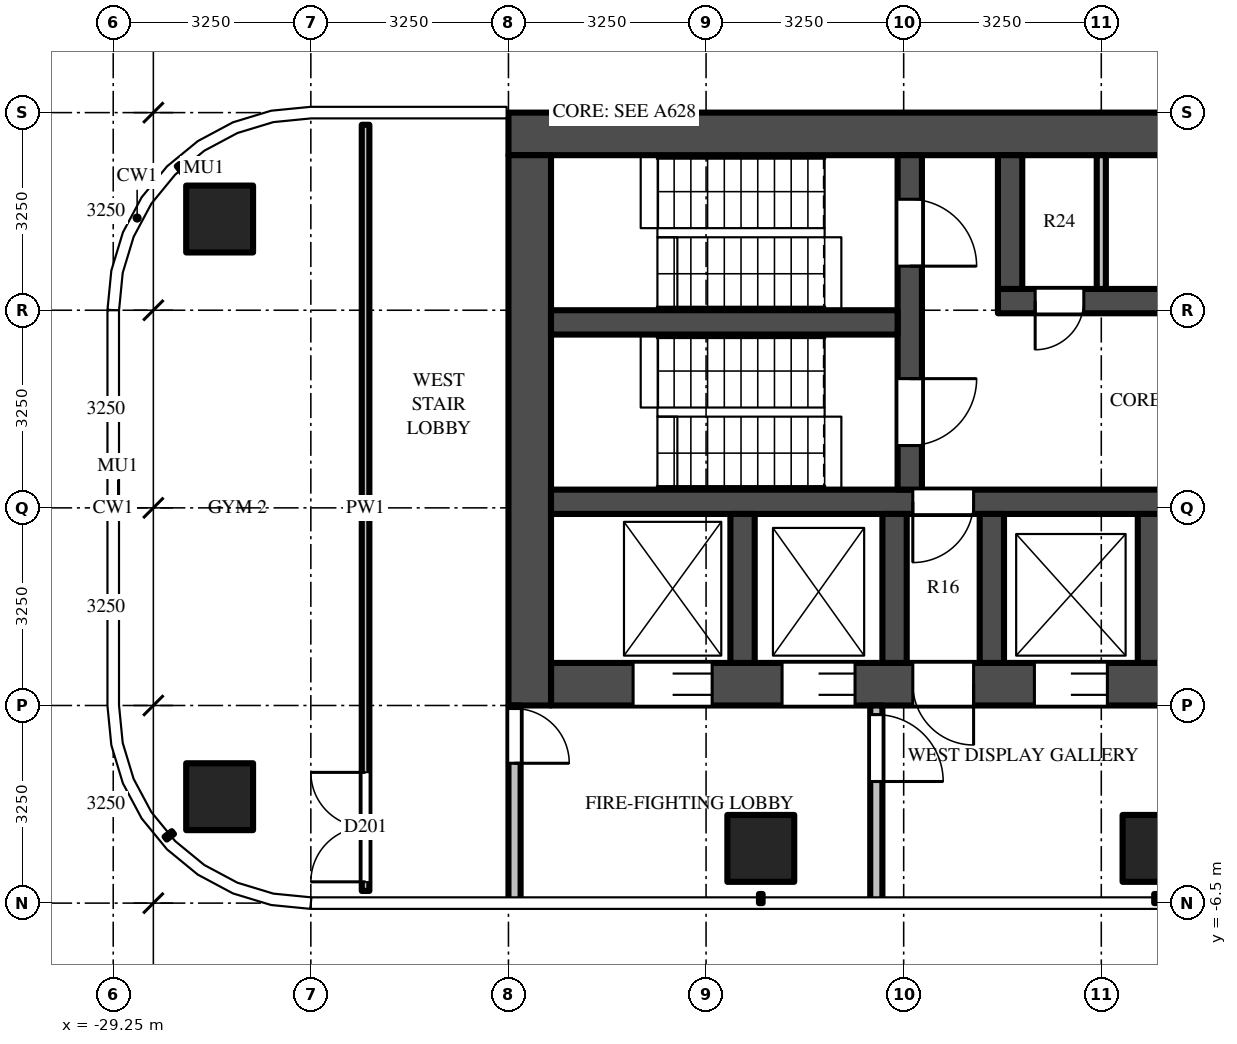
"""IFC4 building model, lengths in metres.
Left out: names, types, materials, properties, quantities, classifications, styles, units other than length and angle.
Written with IfcOpenShell. Run it as: python <this file> out.ifc"""

import sys

from ifc_helpers import new_model, si_unit, direction, frame, frame_2d, origin, origin_2d, place, context, subcontext, project, spatial, rectangle, extrude, source, transform, mapped, element, fill, save


model = new_model("IFC4")
c1 = context("Model", 3, precision=1e-05, world=origin(), true_north=direction((0.0, 1.0)))
c2 = subcontext(c1, "Body", "Model", "MODEL_VIEW")
j1 = project(units=[si_unit("LENGTHUNIT", "METRE"), si_unit("PLANEANGLEUNIT", "RADIAN")], contexts=[c1])
p1 = place(None, origin())
s1 = spatial("IfcSite", under=j1, at=p1, CompositionType="ELEMENT")
p2 = place(p1, origin())
s2 = spatial("IfcBuilding", under=s1, at=p2, CompositionType="ELEMENT")
p3 = place(p2, frame((0.0, 0.0, 220.7)))
s3 = spatial("IfcBuildingStorey", under=s2, at=p3, CompositionType="ELEMENT", Elevation=220.7)
m1 = source(origin(), c2, "Body", "SweptSolid", [
    extrude(rectangle(XDim=1.1, YDim=1.1, at=origin_2d()), origin(), (0.0, 0.0, 1.0), 3.9),
])
for number, where, z_axis, x_axis in (
    (1, (-12.1, -5.6, 0.0), (0.0, 0.0, 1.0), (1.0, 0.0, 0.0)),
    (2, (-18.6, -5.6, 0.0), (0.0, 0.0, 1.0), (1.0, 0.0, 0.0)),
    (3, (-27.5, -4.75, 0.0), (0.0, 0.0, 1.0), (1.0, 0.0, 0.0)),
    (4, (-27.5, 4.75, 0.0), (0.0, 0.0, 1.0), (1.0, 0.0, 0.0)),
):
    element("IfcColumn", number, at=place(p3, frame(where, z_axis=z_axis, x_axis=x_axis)), inside=s3, PredefinedType="COLUMN", context=c2, shape_type="MappedRepresentation", body=[
        mapped(m1, transform((0.0, 0.0, 0.0))),
    ])
m2 = source(origin(), c2, "Body", "SweptSolid", [
    extrude(rectangle(XDim=16.6, YDim=0.7, at=frame_2d((8.3, 0.0))), origin(), (0.0, 0.0, 1.0), 3.7),
])
p4 = place(p3, frame((-6.15, 6.15, 0.0), z_axis=(0.0, 0.0, 1.0), x_axis=(-1.0, 0.0, 0.0)))
e5 = element("IfcWall", 5, at=p4, inside=s3, PredefinedType="SHEAR", context=c2, shape_type="MappedRepresentation", body=[
    mapped(m2, transform((0.0, 0.0, 0.0))),
])
m3 = source(origin(), c2, "Body", "SweptSolid", [
    extrude(rectangle(XDim=14.85, YDim=0.7, at=frame_2d((7.425, 0.0))), origin(), (0.0, 0.0, 1.0), 3.7),
])
p5 = place(p3, frame((-7.2, -2.9, 0.0), z_axis=(0.0, 0.0, 1.0), x_axis=(-1.0, 0.0, 0.0)))
e6 = element("IfcWall", 6, at=p5, inside=s3, PredefinedType="SHEAR", context=c2, shape_type="MappedRepresentation", body=[
    mapped(m3, transform((0.0, 0.0, 0.0))),
])
m4 = source(origin(), c2, "Body", "SweptSolid", [
    extrude(rectangle(XDim=1.1, YDim=2.1, at=frame_2d((0.55, 1.05))), frame((0.0, 0.36, 0.0), z_axis=(0.0, -1.0, 0.0), x_axis=(1.0, 0.0, 0.0)), (0.0, 0.0, 1.0), 0.72),
])
p6 = place(p5, frame((0.55, 0.0, 0.0)))
e7 = element("IfcOpeningElement", 7, at=p6, cuts=e6, PredefinedType="OPENING", context=c2, shape_type="MappedRepresentation", body=[
    mapped(m4, transform((0.0, 0.0, 0.0))),
])
p7 = place(p5, frame((3.15, 0.0, 0.0)))
e8 = element("IfcOpeningElement", 8, at=p7, cuts=e6, PredefinedType="OPENING", context=c2, shape_type="MappedRepresentation", body=[
    mapped(m4, transform((0.0, 0.0, 0.0))),
])
m5 = source(origin(), c2, "Body", "SweptSolid", [
    extrude(rectangle(XDim=1.2, YDim=2.1, at=frame_2d((0.6, 1.05))), frame((0.0, 0.36, 0.0), z_axis=(0.0, -1.0, 0.0), x_axis=(1.0, 0.0, 0.0)), (0.0, 0.0, 1.0), 0.72),
])
p8 = place(p5, frame((5.7, 0.0, 0.0)))
e9 = element("IfcOpeningElement", 9, at=p8, cuts=e6, PredefinedType="OPENING", context=c2, shape_type="MappedRepresentation", body=[
    mapped(m5, transform((0.0, 0.0, 0.0))),
])
m6 = source(origin(), c2, "Body", "SweptSolid", [
    extrude(rectangle(XDim=1.3, YDim=2.1, at=frame_2d((0.65, 1.05))), frame((0.0, 0.36, 0.0), z_axis=(0.0, -1.0, 0.0), x_axis=(1.0, 0.0, 0.0)), (0.0, 0.0, 1.0), 0.72),
])
p9 = place(p5, frame((12.2, 0.0, 0.0)))
e10 = element("IfcOpeningElement", 10, at=p9, cuts=e6, PredefinedType="OPENING", context=c2, shape_type="MappedRepresentation", body=[
    mapped(m6, transform((0.0, 0.0, 0.0))),
])
p10 = place(p5, frame((9.85, 0.0, 0.0)))
e11 = element("IfcOpeningElement", 11, at=p10, cuts=e6, PredefinedType="OPENING", context=c2, shape_type="MappedRepresentation", body=[
    mapped(m5, transform((0.0, 0.0, 0.0))),
])
m7 = source(origin(), c2, "Body", "SweptSolid", [
    extrude(rectangle(XDim=1.0, YDim=2.1, at=frame_2d((0.5, 1.05))), frame((0.0, 0.36, 0.0), z_axis=(0.0, -1.0, 0.0), x_axis=(1.0, 0.0, 0.0)), (0.0, 0.0, 1.0), 0.72),
])
p11 = place(p5, frame((7.9, 0.0, 0.0)))
e12 = element("IfcOpeningElement", 12, at=p11, cuts=e6, PredefinedType="OPENING", context=c2, shape_type="MappedRepresentation", body=[
    mapped(m7, transform((0.0, 0.0, 0.0))),
])
m8 = source(origin(), c2, "Body", "SweptSolid", [
    extrude(rectangle(XDim=9.05, YDim=0.7, at=frame_2d((4.525, 0.0))), origin(), (0.0, 0.0, 1.0), 3.7),
])
p12 = place(p3, frame((-22.4, 5.8, 0.0), z_axis=(0.0, 0.0, 1.0), x_axis=(0.0, -1.0, 0.0)))
e13 = element("IfcWall", 13, at=p12, inside=s3, PredefinedType="SHEAR", context=c2, shape_type="MappedRepresentation", body=[
    mapped(m8, transform((0.0, 0.0, 0.0))),
])
m9 = source(origin(), c2, "Body", "SweptSolid", [
    extrude(rectangle(XDim=7.5, YDim=0.4, at=frame_2d((3.75, 0.0))), origin(), (0.0, 0.0, 1.0), 3.7),
])
p13 = place(p3, frame((-7.2, 3.4, 0.0), z_axis=(0.0, 0.0, 1.0), x_axis=(-1.0, 0.0, 0.0)))
e14 = element("IfcWall", 14, at=p13, inside=s3, PredefinedType="SHEAR", context=c2, shape_type="MappedRepresentation", body=[
    mapped(m9, transform((0.0, 0.0, 0.0))),
])
m10 = source(origin(), c2, "Body", "SweptSolid", [
    extrude(rectangle(XDim=1.0, YDim=2.1, at=frame_2d((0.5, 1.05))), frame((0.0, 0.21, 0.0), z_axis=(0.0, -1.0, 0.0), x_axis=(1.0, 0.0, 0.0)), (0.0, 0.0, 1.0), 0.42),
])
p14 = place(p13, frame((2.363, 0.0, 0.0)))
e15 = element("IfcOpeningElement", 15, at=p14, cuts=e14, PredefinedType="OPENING", context=c2, shape_type="MappedRepresentation", body=[
    mapped(m10, transform((0.0, 0.0, 0.0))),
])
m11 = source(origin(), c2, "Body", "SweptSolid", [
    extrude(rectangle(XDim=0.8, YDim=2.1, at=frame_2d((0.4, 1.05))), frame((0.0, 0.21, 0.0), z_axis=(0.0, -1.0, 0.0), x_axis=(1.0, 0.0, 0.0)), (0.0, 0.0, 1.0), 0.42),
])
p15 = place(p13, frame((6.087, 0.0, 0.0)))
e16 = element("IfcOpeningElement", 16, at=p15, cuts=e14, PredefinedType="OPENING", context=c2, shape_type="MappedRepresentation", body=[
    mapped(m11, transform((0.0, 0.0, 0.0))),
])
m12 = source(origin(), c2, "Body", "SweptSolid", [
    extrude(rectangle(XDim=14.85, YDim=0.4, at=frame_2d((7.425, 0.0))), origin(), (0.0, 0.0, 1.0), 3.7),
])
p16 = place(p3, frame((-7.2, 0.1, 0.0), z_axis=(0.0, 0.0, 1.0), x_axis=(-1.0, 0.0, 0.0)))
e17 = element("IfcWall", 17, at=p16, inside=s3, PredefinedType="SHEAR", context=c2, shape_type="MappedRepresentation", body=[
    mapped(m12, transform((0.0, 0.0, 0.0))),
])
p17 = place(p16, frame((7.9, 0.0, 0.0)))
e18 = element("IfcOpeningElement", 18, at=p17, cuts=e17, PredefinedType="OPENING", context=c2, shape_type="MappedRepresentation", body=[
    mapped(m10, transform((0.0, 0.0, 0.0))),
])
m13 = source(origin(), c2, "Body", "SweptSolid", [
    extrude(rectangle(XDim=5.5, YDim=0.4, at=frame_2d((2.75, 0.0))), origin(), (0.0, 0.0, 1.0), 3.7),
])
p18 = place(p3, frame((-16.15, 5.8, 0.0), z_axis=(0.0, 0.0, 1.0), x_axis=(0.0, -1.0, 0.0)))
e19 = element("IfcWall", 19, at=p18, inside=s3, PredefinedType="SHEAR", context=c2, shape_type="MappedRepresentation", body=[
    mapped(m13, transform((0.0, 0.0, 0.0))),
])
m14 = source(origin(), c2, "Body", "SweptSolid", [
    extrude(rectangle(XDim=1.1, YDim=2.1, at=frame_2d((0.55, 1.05))), frame((0.0, 0.21, 0.0), z_axis=(0.0, -1.0, 0.0), x_axis=(1.0, 0.0, 0.0)), (0.0, 0.0, 1.0), 0.42),
])
p19 = place(p18, frame((0.725, 0.0, 0.0)))
e20 = element("IfcOpeningElement", 20, at=p19, cuts=e19, PredefinedType="OPENING", context=c2, shape_type="MappedRepresentation", body=[
    mapped(m14, transform((0.0, 0.0, 0.0))),
])
p20 = place(p18, frame((3.675, 0.0, 0.0)))
e21 = element("IfcOpeningElement", 21, at=p20, cuts=e19, PredefinedType="OPENING", context=c2, shape_type="MappedRepresentation", body=[
    mapped(m14, transform((0.0, 0.0, 0.0))),
])
m15 = source(origin(), c2, "Body", "SweptSolid", [
    extrude(rectangle(XDim=5.7, YDim=0.4, at=frame_2d((2.85, 0.0))), origin(), (0.0, 0.0, 1.0), 3.7),
])
p21 = place(p3, frame((-16.35, 3.05, 0.0), z_axis=(0.0, 0.0, 1.0), x_axis=(-1.0, 0.0, 0.0)))
e22 = element("IfcWall", 22, at=p21, inside=s3, PredefinedType="SHEAR", context=c2, shape_type="MappedRepresentation", body=[
    mapped(m15, transform((0.0, 0.0, 0.0))),
])
m16 = source(origin(), c2, "Body", "SweptSolid", [
    extrude(rectangle(XDim=2.2, YDim=0.4, at=frame_2d((1.1, 0.0))), origin(), (0.0, 0.0, 1.0), 3.7),
])
p22 = place(p3, frame((-14.5, 5.8, 0.0), z_axis=(0.0, 0.0, 1.0), x_axis=(0.0, -1.0, 0.0)))
e23 = element("IfcWall", 23, at=p22, inside=s3, PredefinedType="SHEAR", context=c2, shape_type="MappedRepresentation", body=[
    mapped(m16, transform((0.0, 0.0, 0.0))),
])
m17 = source(origin(), c2, "Body", "SweptSolid", [
    extrude(rectangle(XDim=2.45, YDim=0.4, at=frame_2d((1.225, 0.0))), origin(), (0.0, 0.0, 1.0), 3.7),
])
for number, where, z_axis, x_axis in (
    (24, (-12.2, -0.1, 0.0), (0.0, 0.0, 1.0), (0.0, -1.0, 0.0)),
    (25, (-14.8, -0.1, 0.0), (0.0, 0.0, 1.0), (0.0, -1.0, 0.0)),
    (26, (-16.4, -0.1, 0.0), (0.0, 0.0, 1.0), (0.0, -1.0, 0.0)),
    (27, (-18.9, -0.1, 0.0), (0.0, 0.0, 1.0), (0.0, -1.0, 0.0)),
):
    element("IfcWall", number, at=place(p3, frame(where, z_axis=z_axis, x_axis=x_axis)), inside=s3, PredefinedType="SHEAR", context=c2, shape_type="MappedRepresentation", body=[
        mapped(m17, transform((0.0, 0.0, 0.0))),
    ])
m18 = source(origin(), c2, "Body", "SweptSolid", [
    extrude(rectangle(XDim=3.25, YDim=0.2, at=frame_2d((1.625, 0.0))), origin(), (0.0, 0.0, 1.0), 3.7),
])
p23 = place(p3, frame((-16.7, -3.25, 0.0), z_axis=(0.0, 0.0, 1.0), x_axis=(0.0, -1.0, 0.0)))
e28 = element("IfcWall", 28, at=p23, inside=s3, PredefinedType="PARTITIONING", context=c2, shape_type="MappedRepresentation", body=[
    mapped(m18, transform((0.0, 0.0, 0.0))),
])
m19 = source(origin(), c2, "Body", "SweptSolid", [
    extrude(rectangle(XDim=1.1, YDim=2.1, at=frame_2d((0.55, 1.05))), frame((0.0, 0.11, 0.0), z_axis=(0.0, -1.0, 0.0), x_axis=(1.0, 0.0, 0.0)), (0.0, 0.0, 1.0), 0.22),
])
p24 = place(p23, frame((0.15, 0.0, 0.0)))
e29 = element("IfcOpeningElement", 29, at=p24, cuts=e28, PredefinedType="OPENING", context=c2, shape_type="MappedRepresentation", body=[
    mapped(m19, transform((0.0, 0.0, 0.0))),
])
p25 = place(p3, frame((-22.65, -3.25, 0.0), z_axis=(0.0, 0.0, 1.0), x_axis=(0.0, -1.0, 0.0)))
e30 = element("IfcWall", 30, at=p25, inside=s3, PredefinedType="PARTITIONING", context=c2, shape_type="MappedRepresentation", body=[
    mapped(m18, transform((0.0, 0.0, 0.0))),
])
m20 = source(origin(), c2, "Body", "SweptSolid", [
    extrude(rectangle(XDim=0.9, YDim=2.1, at=frame_2d((0.45, 1.05))), frame((0.0, 0.11, 0.0), z_axis=(0.0, -1.0, 0.0), x_axis=(1.0, 0.0, 0.0)), (0.0, 0.0, 1.0), 0.22),
])
p26 = place(p25, frame((0.05, 0.0, 0.0)))
e31 = element("IfcOpeningElement", 31, at=p26, cuts=e30, PredefinedType="OPENING", context=c2, shape_type="MappedRepresentation", body=[
    mapped(m20, transform((0.0, 0.0, 0.0))),
])
m21 = source(origin(), c2, "Body", "SweptSolid", [
    extrude(rectangle(XDim=2.2, YDim=0.15, at=frame_2d((1.1, 0.0))), origin(), (0.0, 0.0, 1.0), 3.7),
])
p27 = place(p3, frame((-13.0, 5.8, 0.0), z_axis=(0.0, 0.0, 1.0), x_axis=(0.0, -1.0, 0.0)))
e32 = element("IfcWall", 32, at=p27, inside=s3, PredefinedType="PARTITIONING", context=c2, shape_type="MappedRepresentation", body=[
    mapped(m21, transform((0.0, 0.0, 0.0))),
])
m22 = source(origin(), c2, "Body", "SweptSolid", [
    extrude(rectangle(XDim=12.6, YDim=0.125, at=frame_2d((6.3, 0.0))), origin(), (0.0, 0.0, 1.0), 2.78),
])
p28 = place(p3, frame((-25.1, -6.3, 0.0), z_axis=(0.0, 0.0, 1.0), x_axis=(0.0, 1.0, 0.0)))
e33 = element("IfcWall", 33, at=p28, inside=s3, PredefinedType="PARTITIONING", context=c2, shape_type="MappedRepresentation", body=[
    mapped(m22, transform((0.0, 0.0, 0.0))),
])
m23 = source(origin(), c2, "Body", "SweptSolid", [
    extrude(rectangle(XDim=1.8, YDim=2.1, at=frame_2d((0.9, 1.05))), frame((0.0, 0.073, 0.0), z_axis=(0.0, -1.0, 0.0), x_axis=(1.0, 0.0, 0.0)), (0.0, 0.0, 1.0), 0.145),
])
p29 = place(p28, frame((0.15, 0.0, 0.0)))
e34 = element("IfcOpeningElement", 34, at=p29, cuts=e33, PredefinedType="OPENING", context=c2, shape_type="MappedRepresentation", body=[
    mapped(m23, transform((0.0, 0.0, 0.0))),
])
m24 = source(origin(), c2, "Body", "SweptSolid", [
    extrude(rectangle(XDim=1.2, YDim=2.1, at=frame_2d((0.6, 1.05))), frame((0.0, -0.275, 0.0), z_axis=(0.0, -1.0, 0.0), x_axis=(1.0, 0.0, 0.0)), (0.0, 0.0, 1.0), 0.05),
])
p30 = place(p8, origin())
e35 = element("IfcDoor", 35, at=p30, inside=s3, OperationType="DOUBLE_DOOR_SLIDING", PredefinedType="DOOR", context=c2, shape_type="MappedRepresentation", body=[
    mapped(m24, transform((0.0, 0.0, 0.0))),
])
fill(e9, e35)
m25 = source(origin(), c2, "Body", "SweptSolid", [
    extrude(rectangle(XDim=1.3, YDim=2.1, at=frame_2d((0.65, 1.05))), frame((0.0, -0.275, 0.0), z_axis=(0.0, -1.0, 0.0), x_axis=(1.0, 0.0, 0.0)), (0.0, 0.0, 1.0), 0.05),
])
p31 = place(p9, origin())
e36 = element("IfcDoor", 36, at=p31, inside=s3, OperationType="DOUBLE_DOOR_SLIDING", PredefinedType="DOOR", context=c2, shape_type="MappedRepresentation", body=[
    mapped(m25, transform((0.0, 0.0, 0.0))),
])
fill(e10, e36)
p32 = place(p10, origin())
e37 = element("IfcDoor", 37, at=p32, inside=s3, OperationType="DOUBLE_DOOR_SLIDING", PredefinedType="DOOR", context=c2, shape_type="MappedRepresentation", body=[
    mapped(m24, transform((0.0, 0.0, 0.0))),
])
fill(e11, e37)
m26 = source(origin(), c2, "Body", "SweptSolid", [
    extrude(rectangle(XDim=1.1, YDim=2.1, at=frame_2d((0.55, 1.05))), frame((0.0, 0.025, 0.0), z_axis=(0.0, -1.0, 0.0), x_axis=(1.0, 0.0, 0.0)), (0.0, 0.0, 1.0), 0.05),
])
p33 = place(p19, origin())
e38 = element("IfcDoor", 38, at=p33, inside=s3, OperationType="SINGLE_SWING_RIGHT", PredefinedType="DOOR", context=c2, shape_type="MappedRepresentation", body=[
    mapped(m26, transform((0.0, 0.0, 0.0))),
])
fill(e20, e38)
p34 = place(p20, origin())
e39 = element("IfcDoor", 39, at=p34, inside=s3, OperationType="SINGLE_SWING_LEFT", PredefinedType="DOOR", context=c2, shape_type="MappedRepresentation", body=[
    mapped(m26, transform((0.0, 0.0, 0.0))),
])
fill(e21, e39)
m27 = source(origin(), c2, "Body", "SweptSolid", [
    extrude(rectangle(XDim=1.0, YDim=2.1, at=frame_2d((0.5, 1.05))), frame((0.0, 0.025, 0.0), z_axis=(0.0, -1.0, 0.0), x_axis=(1.0, 0.0, 0.0)), (0.0, 0.0, 1.0), 0.05),
])
p35 = place(p17, origin())
e40 = element("IfcDoor", 40, at=p35, inside=s3, OperationType="SINGLE_SWING_RIGHT", PredefinedType="DOOR", context=c2, shape_type="MappedRepresentation", body=[
    mapped(m27, transform((0.0, 0.0, 0.0))),
])
fill(e18, e40)
m28 = source(origin(), c2, "Body", "SweptSolid", [
    extrude(rectangle(XDim=1.0, YDim=2.1, at=frame_2d((0.5, 1.05))), frame((0.0, -0.275, 0.0), z_axis=(0.0, -1.0, 0.0), x_axis=(1.0, 0.0, 0.0)), (0.0, 0.0, 1.0), 0.05),
])
p36 = place(p11, origin())
e41 = element("IfcDoor", 41, at=p36, inside=s3, OperationType="SINGLE_SWING_LEFT", PredefinedType="DOOR", context=c2, shape_type="MappedRepresentation", body=[
    mapped(m28, transform((0.0, 0.0, 0.0))),
])
fill(e12, e41)
p37 = place(p24, origin())
e42 = element("IfcDoor", 42, at=p37, inside=s3, OperationType="SINGLE_SWING_RIGHT", PredefinedType="DOOR", context=c2, shape_type="MappedRepresentation", body=[
    mapped(m26, transform((0.0, 0.0, 0.0))),
])
fill(e29, e42)
m29 = source(origin(), c2, "Body", "SweptSolid", [
    extrude(rectangle(XDim=0.9, YDim=2.1, at=frame_2d((0.45, 1.05))), frame((0.0, 0.025, 0.0), z_axis=(0.0, -1.0, 0.0), x_axis=(1.0, 0.0, 0.0)), (0.0, 0.0, 1.0), 0.05),
])
p38 = place(p26, origin())
e43 = element("IfcDoor", 43, at=p38, inside=s3, OperationType="SINGLE_SWING_RIGHT", PredefinedType="DOOR", context=c2, shape_type="MappedRepresentation", body=[
    mapped(m29, transform((0.0, 0.0, 0.0))),
])
fill(e31, e43)
m30 = source(origin(), c2, "Body", "SweptSolid", [
    extrude(rectangle(XDim=0.8, YDim=2.1, at=frame_2d((0.4, 1.05))), frame((0.0, 0.025, 0.0), z_axis=(0.0, -1.0, 0.0), x_axis=(1.0, 0.0, 0.0)), (0.0, 0.0, 1.0), 0.05),
])
p39 = place(p15, origin())
e44 = element("IfcDoor", 44, at=p39, inside=s3, OperationType="SINGLE_SWING_RIGHT", PredefinedType="DOOR", context=c2, shape_type="MappedRepresentation", body=[
    mapped(m30, transform((0.0, 0.0, 0.0))),
])
fill(e16, e44)
m31 = source(origin(), c2, "Body", "SweptSolid", [
    extrude(rectangle(XDim=1.8, YDim=2.1, at=frame_2d((0.9, 1.05))), frame((0.0, 0.025, 0.0), z_axis=(0.0, -1.0, 0.0), x_axis=(1.0, 0.0, 0.0)), (0.0, 0.0, 1.0), 0.05),
])
p40 = place(p29, origin())
e45 = element("IfcDoor", 45, at=p40, inside=s3, OperationType="DOUBLE_DOOR_SINGLE_SWING", PredefinedType="DOOR", context=c2, shape_type="MappedRepresentation", body=[
    mapped(m31, transform((0.0, 0.0, 0.0))),
])
fill(e34, e45)
save(model, sys.argv[1])
